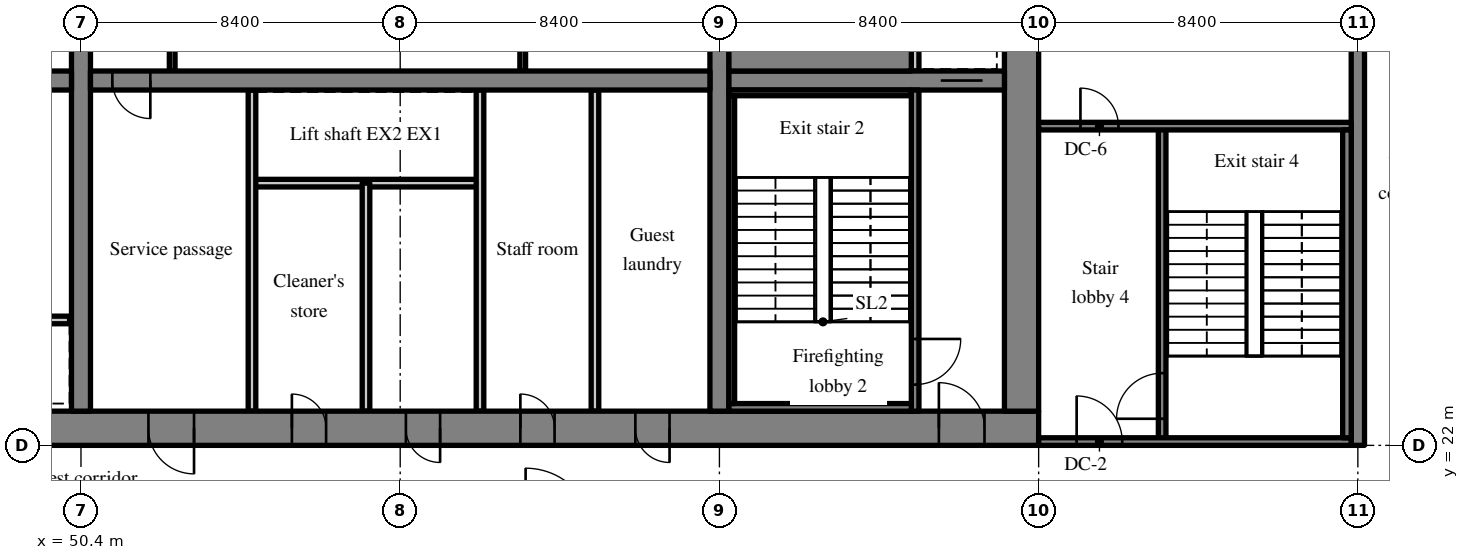
"""IFC4 building model, lengths in metres.
Left out: names, types, materials, properties, quantities, classifications, styles, units other than length and angle.
Written with IfcOpenShell. Run it as: python <this file> out.ifc"""

import sys

from ifc_helpers import new_model, si_unit, direction, frame, frame_2d, origin, place, context, subcontext, project, spatial, rectangle, extrude, source, transform, mapped, element, fill, save


model = new_model("IFC4")
c1 = context("Model", 3, precision=1e-05, world=origin(), true_north=direction((0.0, 1.0)))
c2 = subcontext(c1, "Body", "Model", "MODEL_VIEW")
j1 = project(units=[si_unit("LENGTHUNIT", "METRE"), si_unit("PLANEANGLEUNIT", "RADIAN")], contexts=[c1])
p1 = place(None, origin())
s1 = spatial("IfcSite", under=j1, at=p1, CompositionType="ELEMENT")
p2 = place(p1, origin())
s2 = spatial("IfcBuilding", under=s1, at=p2, CompositionType="ELEMENT")
p3 = place(p2, frame((0.0, 0.0, 114.2)))
s3 = spatial("IfcBuildingStorey", under=s2, at=p3, CompositionType="ELEMENT", Elevation=114.2)
m1 = source(origin(), c2, "Body", "SweptSolid", [
    extrude(rectangle(XDim=50.4, YDim=0.9, at=frame_2d((25.2, 0.0))), origin(), (0.0, 0.0, 1.0), 3.52),
])
p4 = place(p3, frame((25.2, 22.45, 0.0), z_axis=(0.0, 0.0, 1.0), x_axis=(1.0, 0.0, 0.0)))
e1 = element("IfcWall", 1, at=p4, inside=s3, PredefinedType="SHEAR", context=c2, shape_type="MappedRepresentation", body=[
    mapped(m1, transform((0.0, 0.0, 0.0), scale=1.0)),
])
m2 = source(origin(), c2, "Body", "SweptSolid", [
    extrude(rectangle(XDim=1.8, YDim=2.1, at=frame_2d((0.9, 1.05))), frame((0.0, 0.46, 0.0), z_axis=(0.0, -1.0, 0.0), x_axis=(1.0, 0.0, 0.0)), (0.0, 0.0, 1.0), 0.92),
])
p5 = place(p4, frame((15.9, 0.0, 0.0)))
e2 = element("IfcOpeningElement", 2, at=p5, cuts=e1, PredefinedType="OPENING", context=c2, shape_type="MappedRepresentation", body=[
    mapped(m2, transform((0.0, 0.0, 0.0), scale=1.0)),
])
m3 = source(origin(), c2, "Body", "SweptSolid", [
    extrude(rectangle(XDim=1.2, YDim=2.1, at=frame_2d((0.6, 1.05))), frame((0.0, 0.46, 0.0), z_axis=(0.0, -1.0, 0.0), x_axis=(1.0, 0.0, 0.0)), (0.0, 0.0, 1.0), 0.92),
])
p6 = place(p4, frame((26.975, 0.0, 0.0)))
e3 = element("IfcOpeningElement", 3, at=p6, cuts=e1, PredefinedType="OPENING", context=c2, shape_type="MappedRepresentation", body=[
    mapped(m3, transform((0.0, 0.0, 0.0), scale=1.0)),
])
m4 = source(origin(), c2, "Body", "SweptSolid", [
    extrude(rectangle(XDim=0.9, YDim=2.1, at=frame_2d((0.45, 1.05))), frame((0.0, 0.46, 0.0), z_axis=(0.0, -1.0, 0.0), x_axis=(1.0, 0.0, 0.0)), (0.0, 0.0, 1.0), 0.92),
])
p7 = place(p4, frame((33.75, 0.0, 0.0)))
e4 = element("IfcOpeningElement", 4, at=p7, cuts=e1, PredefinedType="OPENING", context=c2, shape_type="MappedRepresentation", body=[
    mapped(m4, transform((0.0, 0.0, 0.0), scale=1.0)),
])
p8 = place(p4, frame((30.75, 0.0, 0.0)))
e5 = element("IfcOpeningElement", 5, at=p8, cuts=e1, PredefinedType="OPENING", context=c2, shape_type="MappedRepresentation", body=[
    mapped(m4, transform((0.0, 0.0, 0.0), scale=1.0)),
])
p9 = place(p4, frame((39.788, 0.0, 0.0)))
e6 = element("IfcOpeningElement", 6, at=p9, cuts=e1, PredefinedType="OPENING", context=c2, shape_type="MappedRepresentation", body=[
    mapped(m4, transform((0.0, 0.0, 0.0), scale=1.0)),
])
p10 = place(p4, frame((36.762, 0.0, 0.0)))
e7 = element("IfcOpeningElement", 7, at=p10, cuts=e1, PredefinedType="OPENING", context=c2, shape_type="MappedRepresentation", body=[
    mapped(m4, transform((0.0, 0.0, 0.0), scale=1.0)),
])
p11 = place(p4, frame((6.45, 0.0, 0.0)))
e8 = element("IfcOpeningElement", 8, at=p11, cuts=e1, PredefinedType="OPENING", context=c2, shape_type="MappedRepresentation", body=[
    mapped(m3, transform((0.0, 0.0, 0.0), scale=1.0)),
])
p12 = place(p4, frame((47.775, 0.0, 0.0)))
e9 = element("IfcOpeningElement", 9, at=p12, cuts=e1, PredefinedType="OPENING", context=c2, shape_type="MappedRepresentation", body=[
    mapped(m3, transform((0.0, 0.0, 0.0), scale=1.0)),
])
m5 = source(origin(), c2, "Body", "SweptSolid", [
    extrude(rectangle(XDim=18.2, YDim=0.9, at=frame_2d((9.1, 0.0))), origin(), (0.0, 0.0, 1.0), 3.52),
])
p13 = place(p3, frame((75.15, 22.9, 0.0), z_axis=(0.0, 0.0, 1.0), x_axis=(0.0, 1.0, 0.0)))
e10 = element("IfcWall", 10, at=p13, inside=s3, PredefinedType="SHEAR", context=c2, shape_type="MappedRepresentation", body=[
    mapped(m5, transform((0.0, 0.0, 0.0), scale=1.0)),
])
p14 = place(p13, frame((12.5, 0.0, 0.0)))
e11 = element("IfcOpeningElement", 11, at=p14, cuts=e10, PredefinedType="OPENING", context=c2, shape_type="MappedRepresentation", body=[
    mapped(m3, transform((0.0, 0.0, 0.0), scale=1.0)),
])
m6 = source(origin(), c2, "Body", "SweptSolid", [
    extrude(rectangle(XDim=18.2, YDim=0.5, at=frame_2d((9.1, 0.0))), origin(), (0.0, 0.0, 1.0), 3.52),
])
p15 = place(p3, frame((50.4, 22.9, 0.0), z_axis=(0.0, 0.0, 1.0), x_axis=(0.0, 1.0, 0.0)))
e12 = element("IfcWall", 12, at=p15, inside=s3, PredefinedType="SHEAR", context=c2, shape_type="MappedRepresentation", body=[
    mapped(m6, transform((0.0, 0.0, 0.0), scale=1.0)),
])
m7 = source(origin(), c2, "Body", "SweptSolid", [
    extrude(rectangle(XDim=1.1, YDim=2.1, at=frame_2d((0.55, 1.05))), frame((0.0, 0.26, 0.0), z_axis=(0.0, -1.0, 0.0), x_axis=(1.0, 0.0, 0.0)), (0.0, 0.0, 1.0), 0.52),
])
p16 = place(p15, frame((12.55, 0.0, 0.0)))
e13 = element("IfcOpeningElement", 13, at=p16, cuts=e12, PredefinedType="OPENING", context=c2, shape_type="MappedRepresentation", body=[
    mapped(m7, transform((0.0, 0.0, 0.0), scale=1.0)),
])
p17 = place(p3, frame((67.2, 22.9, 0.0), z_axis=(0.0, 0.0, 1.0), x_axis=(0.0, 1.0, 0.0)))
e14 = element("IfcWall", 14, at=p17, inside=s3, PredefinedType="SHEAR", context=c2, shape_type="MappedRepresentation", body=[
    mapped(m6, transform((0.0, 0.0, 0.0), scale=1.0)),
])
m8 = source(origin(), c2, "Body", "SweptSolid", [
    extrude(rectangle(XDim=16.3, YDim=0.5, at=frame_2d((8.15, 0.0))), origin(), (0.0, 0.0, 1.0), 3.52),
])
p18 = place(p3, frame((33.85, 31.6, 0.0), z_axis=(0.0, 0.0, 1.0), x_axis=(1.0, 0.0, 0.0)))
e15 = element("IfcWall", 15, at=p18, inside=s3, PredefinedType="SHEAR", context=c2, shape_type="MappedRepresentation", body=[
    mapped(m8, transform((0.0, 0.0, 0.0), scale=1.0)),
])
m9 = source(origin(), c2, "Body", "SweptSolid", [
    extrude(rectangle(XDim=1.0, YDim=2.1, at=frame_2d((0.5, 1.05))), frame((0.0, 0.26, 0.0), z_axis=(0.0, -1.0, 0.0), x_axis=(1.0, 0.0, 0.0)), (0.0, 0.0, 1.0), 0.52),
])
p19 = place(p18, frame((14.725, 0.0, 0.0)))
e16 = element("IfcOpeningElement", 16, at=p19, cuts=e15, PredefinedType="OPENING", context=c2, shape_type="MappedRepresentation", body=[
    mapped(m9, transform((0.0, 0.0, 0.0), scale=1.0)),
])
m10 = source(origin(), c2, "Body", "SweptSolid", [
    extrude(rectangle(XDim=16.3, YDim=0.5, at=frame_2d((8.15, 0.0))), origin(), (0.0, 0.0, 1.0), 3.52),
])
p20 = place(p3, frame((50.65, 31.6, 0.0), z_axis=(0.0, 0.0, 1.0), x_axis=(1.0, 0.0, 0.0)))
e17 = element("IfcWall", 17, at=p20, inside=s3, PredefinedType="SHEAR", context=c2, shape_type="MappedRepresentation", body=[
    mapped(m10, transform((0.0, 0.0, 0.0), scale=1.0)),
])
p21 = place(p20, frame((0.575, 0.0, 0.0)))
e18 = element("IfcOpeningElement", 18, at=p21, cuts=e17, PredefinedType="OPENING", context=c2, shape_type="MappedRepresentation", body=[
    mapped(m9, transform((0.0, 0.0, 0.0), scale=1.0)),
])
m11 = source(origin(), c2, "Body", "SweptSolid", [
    extrude(rectangle(XDim=7.25, YDim=0.5, at=frame_2d((3.625, 0.0))), origin(), (0.0, 0.0, 1.0), 3.52),
])
p22 = place(p3, frame((67.45, 31.6, 0.0), z_axis=(0.0, 0.0, 1.0), x_axis=(1.0, 0.0, 0.0)))
e19 = element("IfcWall", 19, at=p22, inside=s3, PredefinedType="SHEAR", context=c2, shape_type="MappedRepresentation", body=[
    mapped(m11, transform((0.0, 0.0, 0.0), scale=1.0)),
])
p23 = place(p22, frame((5.575, 0.0, 0.0)))
e20 = element("IfcOpeningElement", 20, at=p23, cuts=e19, PredefinedType="OPENING", context=c2, shape_type="MappedRepresentation", body=[
    mapped(m7, transform((0.0, 0.0, 0.0), scale=1.0)),
])
m12 = source(origin(), c2, "Body", "SweptSolid", [
    extrude(rectangle(XDim=20.0, YDim=0.35, at=frame_2d((10.0, 0.0))), origin(), (0.0, 0.0, 1.0), 3.52),
])
p24 = place(p3, frame((84.0, 22.0, 0.0), z_axis=(0.0, 0.0, 1.0), x_axis=(0.0, 1.0, 0.0)))
e21 = element("IfcWall", 21, at=p24, inside=s3, PredefinedType="SHEAR", context=c2, shape_type="MappedRepresentation", body=[
    mapped(m12, transform((0.0, 0.0, 0.0), scale=1.0)),
])
m13 = source(origin(), c2, "Body", "SweptSolid", [
    extrude(rectangle(XDim=6.0, YDim=0.2, at=frame_2d((3.0, 0.0))), origin(), (0.0, 0.0, 1.0), 3.52),
])
p25 = place(p3, frame((44.1, 25.3, 0.0), z_axis=(0.0, 0.0, 1.0), x_axis=(1.0, 0.0, 0.0)))
e22 = element("IfcWall", 22, at=p25, inside=s3, PredefinedType="SOLIDWALL", context=c2, shape_type="MappedRepresentation", body=[
    mapped(m13, transform((0.0, 0.0, 0.0), scale=1.0)),
])
m14 = source(origin(), c2, "Body", "SweptSolid", [
    extrude(rectangle(XDim=1.1, YDim=2.1, at=frame_2d((0.55, 1.05))), frame((0.0, 0.11, 0.0), z_axis=(0.0, -1.0, 0.0), x_axis=(1.0, 0.0, 0.0)), (0.0, 0.0, 1.0), 0.22),
])
p26 = place(p25, frame((0.95, 0.0, 0.0)))
e23 = element("IfcOpeningElement", 23, at=p26, cuts=e22, PredefinedType="OPENING", context=c2, shape_type="MappedRepresentation", body=[
    mapped(m14, transform((0.0, 0.0, 0.0), scale=1.0)),
])
p27 = place(p25, frame((3.95, 0.0, 0.0)))
e24 = element("IfcOpeningElement", 24, at=p27, cuts=e22, PredefinedType="OPENING", context=c2, shape_type="MappedRepresentation", body=[
    mapped(m14, transform((0.0, 0.0, 0.0), scale=1.0)),
])
p28 = place(p3, frame((60.9, 28.9, 0.0), z_axis=(0.0, 0.0, 1.0), x_axis=(-1.0, 0.0, 0.0)))
e25 = element("IfcWall", 25, at=p28, inside=s3, PredefinedType="SOLIDWALL", context=c2, shape_type="MappedRepresentation", body=[
    mapped(m13, transform((0.0, 0.0, 0.0), scale=1.0)),
])
m15 = source(origin(), c2, "Body", "SweptSolid", [
    extrude(rectangle(XDim=8.45, YDim=0.2, at=frame_2d((4.225, 0.0))), origin(), (0.0, 0.0, 1.0), 3.52),
])
for number, where, z_axis, x_axis in (
    (26, (54.9, 22.9, 0.0), (0.0, 0.0, 1.0), (0.0, 1.0, 0.0)),
    (27, (60.9, 22.9, 0.0), (0.0, 0.0, 1.0), (0.0, 1.0, 0.0)),
):
    element("IfcWall", number, at=place(p3, frame(where, z_axis=z_axis, x_axis=x_axis)), inside=s3, PredefinedType="PARTITIONING", context=c2, shape_type="MappedRepresentation", body=[
        mapped(m15, transform((0.0, 0.0, 0.0), scale=1.0)),
    ])
p29 = place(p3, frame((57.9, 22.9, 0.0), z_axis=(0.0, 0.0, 1.0), x_axis=(0.0, 1.0, 0.0)))
e28 = element("IfcWall", 28, at=p29, inside=s3, PredefinedType="PARTITIONING", context=c2, shape_type="MappedRepresentation", body=[
    mapped(m13, transform((0.0, 0.0, 0.0), scale=1.0)),
])
p30 = place(p3, frame((63.925, 22.9, 0.0), z_axis=(0.0, 0.0, 1.0), x_axis=(0.0, 1.0, 0.0)))
e29 = element("IfcWall", 29, at=p30, inside=s3, PredefinedType="PARTITIONING", context=c2, shape_type="MappedRepresentation", body=[
    mapped(m15, transform((0.0, 0.0, 0.0), scale=1.0)),
])
m16 = source(origin(), c2, "Body", "SweptSolid", [
    extrude(rectangle(XDim=3.15, YDim=0.15, at=frame_2d((1.575, 0.0))), origin(), (0.0, 0.0, 1.0), 3.52),
])
for number, where, z_axis, x_axis in (
    (30, (52.8, 31.85, 0.0), (0.0, 0.0, 1.0), (0.0, 1.0, 0.0)),
    (31, (62.024, 31.85, 0.0), (0.0, 0.0, 1.0), (0.0, 1.0, 0.0)),
):
    element("IfcWall", number, at=place(p3, frame(where, z_axis=z_axis, x_axis=x_axis)), inside=s3, PredefinedType="PARTITIONING", context=c2, shape_type="MappedRepresentation", body=[
        mapped(m16, transform((0.0, 0.0, 0.0), scale=1.0)),
    ])
m17 = source(origin(), c2, "Body", "SweptSolid", [
    extrude(rectangle(XDim=8.45, YDim=0.2, at=frame_2d((4.225, 0.0))), origin(), (0.0, 0.0, 1.0), 3.52),
])
p31 = place(p3, frame((72.35, 22.9, 0.0), z_axis=(0.0, 0.0, 1.0), x_axis=(0.0, 1.0, 0.0)))
e32 = element("IfcWall", 32, at=p31, inside=s3, PredefinedType="SOLIDWALL", context=c2, shape_type="MappedRepresentation", body=[
    mapped(m17, transform((0.0, 0.0, 0.0), scale=1.0)),
])
m18 = source(origin(), c2, "Body", "SweptSolid", [
    extrude(rectangle(XDim=1.2, YDim=2.1, at=frame_2d((0.6, 1.05))), frame((0.0, 0.11, 0.0), z_axis=(0.0, -1.0, 0.0), x_axis=(1.0, 0.0, 0.0)), (0.0, 0.0, 1.0), 0.22),
])
p32 = place(p31, frame((0.7, 0.0, 0.0)))
e33 = element("IfcOpeningElement", 33, at=p32, cuts=e32, PredefinedType="OPENING", context=c2, shape_type="MappedRepresentation", body=[
    mapped(m18, transform((0.0, 0.0, 0.0), scale=1.0)),
])
m19 = source(origin(), c2, "Body", "SweptSolid", [
    extrude(rectangle(XDim=1.75, YDim=0.2, at=frame_2d((0.875, 0.0))), origin(), (0.0, 0.0, 1.0), 3.52),
])
p33 = place(p3, frame((72.35, 31.85, 0.0), z_axis=(0.0, 0.0, 1.0), x_axis=(0.0, 1.0, 0.0)))
e34 = element("IfcWall", 34, at=p33, inside=s3, PredefinedType="SOLIDWALL", context=c2, shape_type="MappedRepresentation", body=[
    mapped(m19, transform((0.0, 0.0, 0.0), scale=1.0)),
])
m20 = source(origin(), c2, "Body", "SweptSolid", [
    extrude(rectangle(XDim=8.3, YDim=0.2, at=frame_2d((4.15, 0.0))), origin(), (0.0, 0.0, 1.0), 3.52),
])
p34 = place(p3, frame((78.85, 22.1, 0.0), z_axis=(0.0, 0.0, 1.0), x_axis=(0.0, 1.0, 0.0)))
e35 = element("IfcWall", 35, at=p34, inside=s3, PredefinedType="SOLIDWALL", context=c2, shape_type="MappedRepresentation", body=[
    mapped(m20, transform((0.0, 0.0, 0.0), scale=1.0)),
])
p35 = place(p34, frame((0.6, 0.0, 0.0)))
e36 = element("IfcOpeningElement", 36, at=p35, cuts=e35, PredefinedType="OPENING", context=c2, shape_type="MappedRepresentation", body=[
    mapped(m18, transform((0.0, 0.0, 0.0), scale=1.0)),
])
m21 = source(origin(), c2, "Body", "SweptSolid", [
    extrude(rectangle(XDim=8.225, YDim=0.2, at=frame_2d((4.112, 0.0))), origin(), (0.0, 0.0, 1.0), 3.52),
])
p36 = place(p3, frame((83.825, 22.1, 0.0), z_axis=(0.0, 0.0, 1.0), x_axis=(-1.0, 0.0, 0.0)))
e37 = element("IfcWall", 37, at=p36, inside=s3, PredefinedType="SOLIDWALL", context=c2, shape_type="MappedRepresentation", body=[
    mapped(m21, transform((0.0, 0.0, 0.0), scale=1.0)),
])
p37 = place(p36, frame((6.025, 0.0, 0.0)))
e38 = element("IfcOpeningElement", 38, at=p37, cuts=e37, PredefinedType="OPENING", context=c2, shape_type="MappedRepresentation", body=[
    mapped(m18, transform((0.0, 0.0, 0.0), scale=1.0)),
])
p38 = place(p3, frame((83.825, 30.4, 0.0), z_axis=(0.0, 0.0, 1.0), x_axis=(-1.0, 0.0, 0.0)))
e39 = element("IfcWall", 39, at=p38, inside=s3, PredefinedType="SOLIDWALL", context=c2, shape_type="MappedRepresentation", body=[
    mapped(m21, transform((0.0, 0.0, 0.0), scale=1.0)),
])
m22 = source(origin(), c2, "Body", "SweptSolid", [
    extrude(rectangle(XDim=1.0, YDim=2.1, at=frame_2d((0.5, 1.05))), frame((0.0, 0.11, 0.0), z_axis=(0.0, -1.0, 0.0), x_axis=(1.0, 0.0, 0.0)), (0.0, 0.0, 1.0), 0.22),
])
p39 = place(p38, frame((6.125, 0.0, 0.0)))
e40 = element("IfcOpeningElement", 40, at=p39, cuts=e39, PredefinedType="OPENING", context=c2, shape_type="MappedRepresentation", body=[
    mapped(m22, transform((0.0, 0.0, 0.0), scale=1.0)),
])
m23 = source(origin(), c2, "Body", "SweptSolid", [
    extrude(rectangle(XDim=4.8, YDim=0.2, at=frame_2d((2.4, 0.0))), origin(), (0.0, 0.0, 1.0), 3.52),
])
p40 = place(p3, frame((67.45, 23.0, 0.0), z_axis=(0.0, 0.0, 1.0), x_axis=(1.0, 0.0, 0.0)))
e41 = element("IfcWall", 41, at=p40, inside=s3, PredefinedType="SOLIDWALL", context=c2, shape_type="MappedRepresentation", body=[
    mapped(m23, transform((0.0, 0.0, 0.0), scale=1.0)),
])
m24 = source(origin(), c2, "Body", "SweptSolid", [
    extrude(rectangle(XDim=4.8, YDim=0.15, at=frame_2d((2.4, 0.0))), origin(), (0.0, 0.0, 1.0), 3.52),
])
p41 = place(p3, frame((67.45, 31.275, 0.0), z_axis=(0.0, 0.0, 1.0), x_axis=(1.0, 0.0, 0.0)))
e42 = element("IfcWall", 42, at=p41, inside=s3, PredefinedType="SOLIDWALL", context=c2, shape_type="MappedRepresentation", body=[
    mapped(m24, transform((0.0, 0.0, 0.0), scale=1.0)),
])
m25 = source(origin(), c2, "Body", "SweptSolid", [
    extrude(rectangle(XDim=8.1, YDim=0.15, at=frame_2d((4.05, 0.0))), origin(), (0.0, 0.0, 1.0), 3.52),
])
p42 = place(p3, frame((67.525, 23.1, 0.0), z_axis=(0.0, 0.0, 1.0), x_axis=(0.0, 1.0, 0.0)))
e43 = element("IfcWall", 43, at=p42, inside=s3, PredefinedType="SOLIDWALL", context=c2, shape_type="MappedRepresentation", body=[
    mapped(m25, transform((0.0, 0.0, 0.0), scale=1.0)),
])
m26 = source(origin(), c2, "Body", "SweptSolid", [
    extrude(rectangle(XDim=4.8, YDim=0.95, at=frame_2d((2.4, 0.0))), origin(), (0.0, 0.0, 1.0), 3.52),
])
p43 = place(p3, frame((67.45, 32.325, 0.0), z_axis=(0.0, 0.0, 1.0), x_axis=(1.0, 0.0, 0.0)))
e44 = element("IfcWall", 44, at=p43, inside=s3, PredefinedType="SOLIDWALL", context=c2, shape_type="MappedRepresentation", body=[
    mapped(m26, transform((0.0, 0.0, 0.0), scale=1.0)),
])
m27 = source(origin(), c2, "Body", "SweptSolid", [
    extrude(rectangle(XDim=8.1, YDim=0.225, at=frame_2d((4.05, 0.0))), origin(), (0.0, 0.0, 1.0), 3.52),
])
p44 = place(p3, frame((83.713, 22.2, 0.0), z_axis=(0.0, 0.0, 1.0), x_axis=(0.0, 1.0, 0.0)))
e45 = element("IfcWall", 45, at=p44, inside=s3, PredefinedType="SOLIDWALL", context=c2, shape_type="MappedRepresentation", body=[
    mapped(m27, transform((0.0, 0.0, 0.0), scale=1.0)),
])
m28 = source(origin(), c2, "Body", "SweptSolid", [
    extrude(rectangle(XDim=1.2, YDim=2.1, at=frame_2d((0.6, 1.05))), frame((0.0, 0.375, 0.0), z_axis=(0.0, -1.0, 0.0), x_axis=(1.0, 0.0, 0.0)), (0.0, 0.0, 1.0), 0.05),
])
p45 = place(p6, origin())
e46 = element("IfcDoor", 46, at=p45, inside=s3, OperationType="SINGLE_SWING_RIGHT", PredefinedType="DOOR", context=c2, shape_type="MappedRepresentation", body=[
    mapped(m28, transform((0.0, 0.0, 0.0), scale=1.0)),
])
fill(e3, e46)
m29 = source(origin(), c2, "Body", "SweptSolid", [
    extrude(rectangle(XDim=1.0, YDim=2.1, at=frame_2d((0.5, 1.05))), frame((0.0, 0.025, 0.0), z_axis=(0.0, -1.0, 0.0), x_axis=(1.0, 0.0, 0.0)), (0.0, 0.0, 1.0), 0.05),
])
p46 = place(p21, origin())
e47 = element("IfcDoor", 47, at=p46, inside=s3, OperationType="SINGLE_SWING_RIGHT", PredefinedType="DOOR", context=c2, shape_type="MappedRepresentation", body=[
    mapped(m29, transform((0.0, 0.0, 0.0), scale=1.0)),
])
fill(e18, e47)
m30 = source(origin(), c2, "Body", "SweptSolid", [
    extrude(rectangle(XDim=0.9, YDim=2.1, at=frame_2d((0.45, 1.05))), frame((0.0, 0.375, 0.0), z_axis=(0.0, -1.0, 0.0), x_axis=(1.0, 0.0, 0.0)), (0.0, 0.0, 1.0), 0.05),
])
p47 = place(p7, origin())
e48 = element("IfcDoor", 48, at=p47, inside=s3, OperationType="SINGLE_SWING_RIGHT", PredefinedType="DOOR", context=c2, shape_type="MappedRepresentation", body=[
    mapped(m30, transform((0.0, 0.0, 0.0), scale=1.0)),
])
fill(e4, e48)
p48 = place(p8, origin())
e49 = element("IfcDoor", 49, at=p48, inside=s3, OperationType="SINGLE_SWING_LEFT", PredefinedType="DOOR", context=c2, shape_type="MappedRepresentation", body=[
    mapped(m30, transform((0.0, 0.0, 0.0), scale=1.0)),
])
fill(e5, e49)
p49 = place(p9, origin())
e50 = element("IfcDoor", 50, at=p49, inside=s3, OperationType="SINGLE_SWING_RIGHT", PredefinedType="DOOR", context=c2, shape_type="MappedRepresentation", body=[
    mapped(m30, transform((0.0, 0.0, 0.0), scale=1.0)),
])
fill(e6, e50)
p50 = place(p10, origin())
e51 = element("IfcDoor", 51, at=p50, inside=s3, OperationType="SINGLE_SWING_LEFT", PredefinedType="DOOR", context=c2, shape_type="MappedRepresentation", body=[
    mapped(m30, transform((0.0, 0.0, 0.0), scale=1.0)),
])
fill(e7, e51)
m31 = source(origin(), c2, "Body", "SweptSolid", [
    extrude(rectangle(XDim=1.2, YDim=2.1, at=frame_2d((0.6, 1.05))), frame((0.0, 0.025, 0.0), z_axis=(0.0, -1.0, 0.0), x_axis=(1.0, 0.0, 0.0)), (0.0, 0.0, 1.0), 0.05),
])
p51 = place(p32, origin())
e52 = element("IfcDoor", 52, at=p51, inside=s3, OperationType="SINGLE_SWING_RIGHT", PredefinedType="DOOR", context=c2, shape_type="MappedRepresentation", body=[
    mapped(m31, transform((0.0, 0.0, 0.0), scale=1.0)),
])
fill(e33, e52)
p52 = place(p12, origin())
e53 = element("IfcDoor", 53, at=p52, inside=s3, OperationType="SINGLE_SWING_LEFT", PredefinedType="DOOR", context=c2, shape_type="MappedRepresentation", body=[
    mapped(m28, transform((0.0, 0.0, 0.0), scale=1.0)),
])
fill(e9, e53)
m32 = source(origin(), c2, "Body", "SweptSolid", [
    extrude(rectangle(XDim=1.1, YDim=2.1, at=frame_2d((0.55, 1.05))), frame((0.0, 0.025, 0.0), z_axis=(0.0, -1.0, 0.0), x_axis=(1.0, 0.0, 0.0)), (0.0, 0.0, 1.0), 0.05),
])
p53 = place(p23, origin())
e54 = element("IfcDoor", 54, at=p53, inside=s3, OperationType="SLIDING_TO_RIGHT", PredefinedType="DOOR", context=c2, shape_type="MappedRepresentation", body=[
    mapped(m32, transform((0.0, 0.0, 0.0), scale=1.0)),
])
fill(e20, e54)
p54 = place(p35, origin())
e55 = element("IfcDoor", 55, at=p54, inside=s3, OperationType="SINGLE_SWING_LEFT", PredefinedType="DOOR", context=c2, shape_type="MappedRepresentation", body=[
    mapped(m31, transform((0.0, 0.0, 0.0), scale=1.0)),
])
fill(e36, e55)
p55 = place(p37, origin())
e56 = element("IfcDoor", 56, at=p55, inside=s3, OperationType="SINGLE_SWING_RIGHT", PredefinedType="DOOR", context=c2, shape_type="MappedRepresentation", body=[
    mapped(m31, transform((0.0, 0.0, 0.0), scale=1.0)),
])
fill(e38, e56)
p56 = place(p39, origin())
e57 = element("IfcDoor", 57, at=p56, inside=s3, OperationType="SINGLE_SWING_RIGHT", PredefinedType="DOOR", context=c2, shape_type="MappedRepresentation", body=[
    mapped(m29, transform((0.0, 0.0, 0.0), scale=1.0)),
])
fill(e40, e57)
save(model, sys.argv[1])
